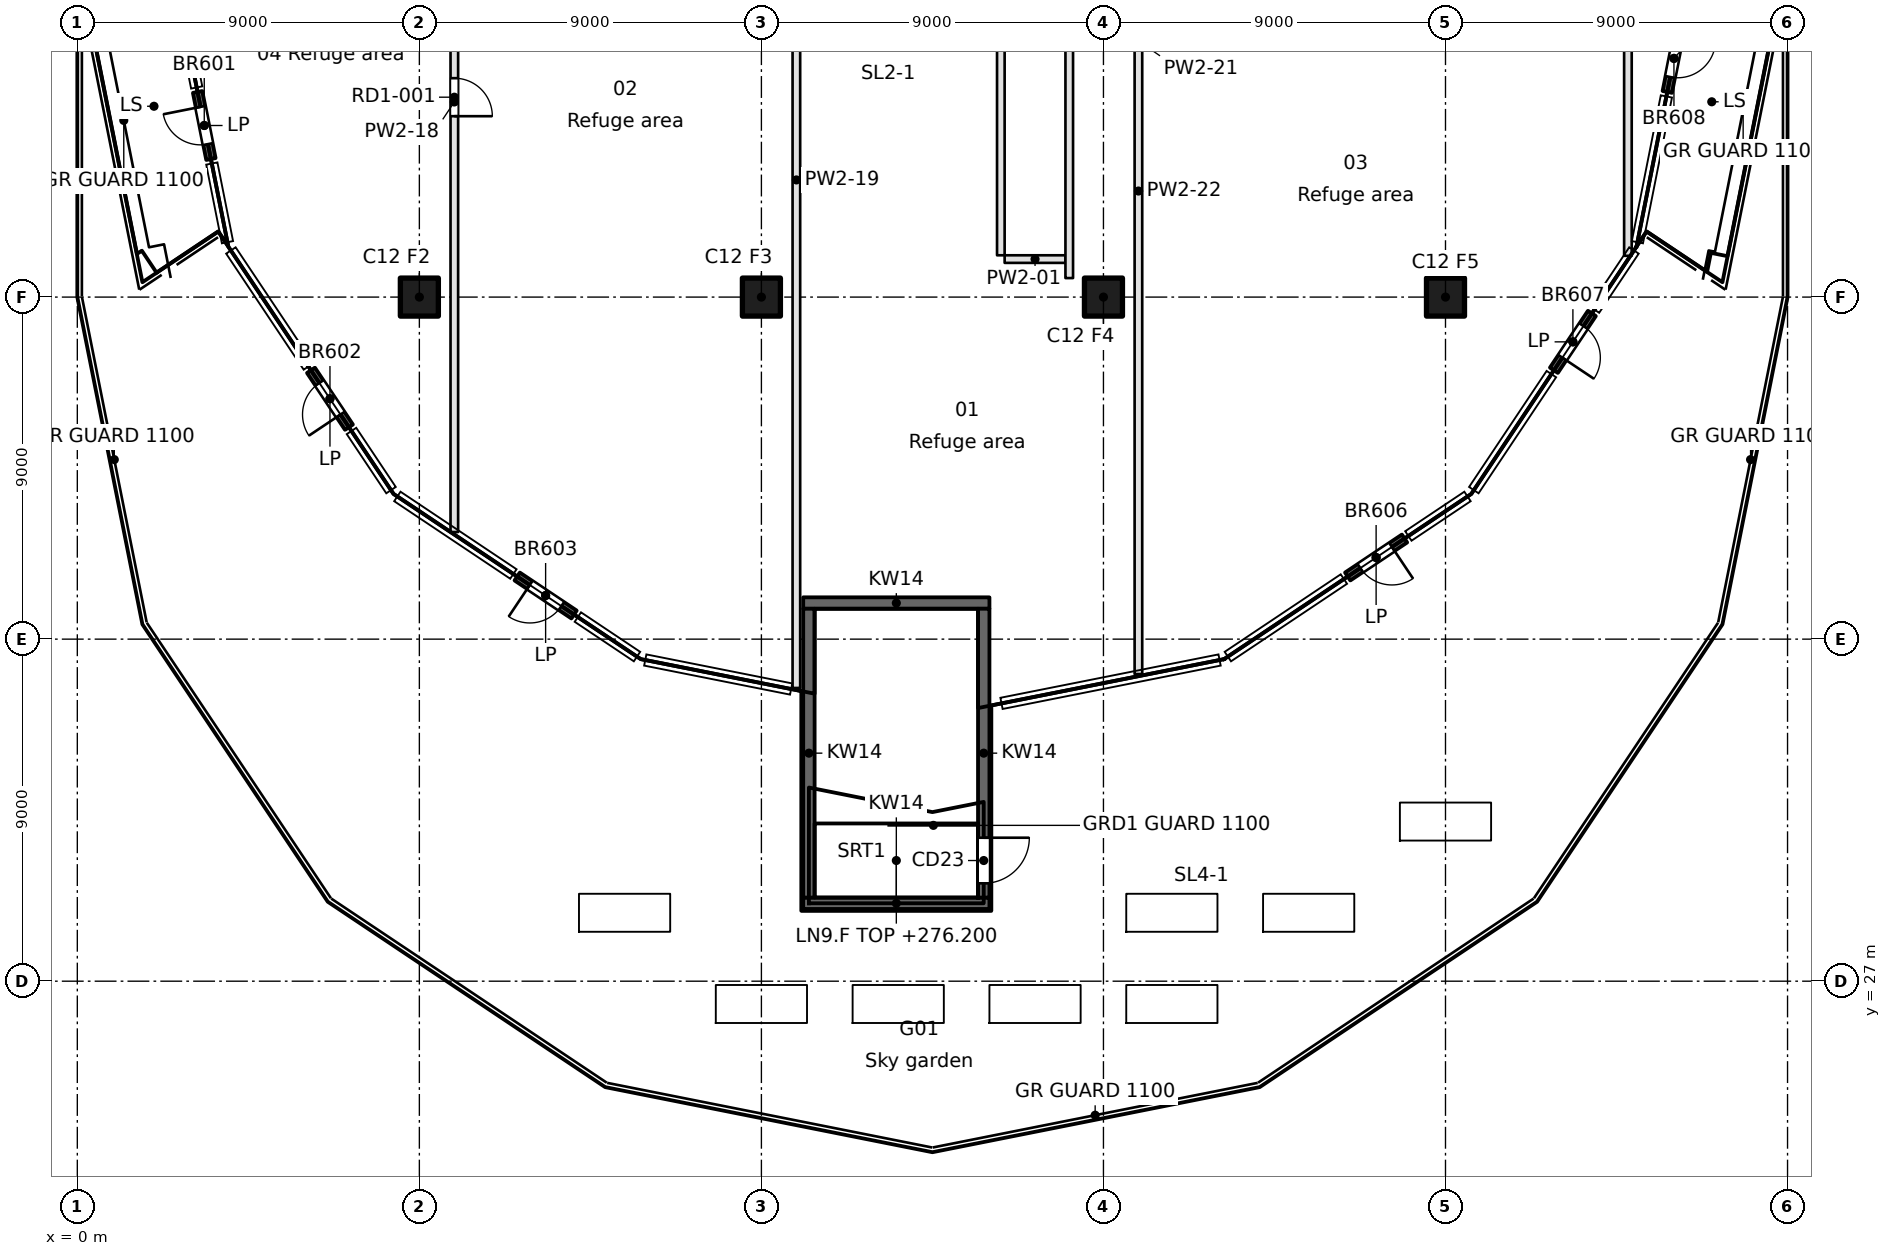
"""IFC4 building model, lengths in metres.
Left out: names, types, materials, properties, quantities, classifications, styles, units other than length and angle.
Written with IfcOpenShell. Run it as: python <this file> out.ifc"""

import sys

from ifc_helpers import new_model, si_unit, direction, frame, frame_2d, origin, origin_2d, place, context, subcontext, project, spatial, rectangle, extrude, element, fill, save


model = new_model("IFC4")
c1 = context("Model", 3, precision=1e-05, world=origin(), true_north=direction((0.0, 1.0)))
c2 = subcontext(c1, "Body", "Model", "MODEL_VIEW")
j1 = project(units=[si_unit("LENGTHUNIT", "METRE"), si_unit("PLANEANGLEUNIT", "RADIAN")], contexts=[c1])
p1 = place(None, origin())
s1 = spatial("IfcSite", under=j1, at=p1, CompositionType="ELEMENT")
p2 = place(p1, origin())
s2 = spatial("IfcBuilding", under=s1, at=p2, CompositionType="ELEMENT")
p3 = place(p2, frame((0.0, 0.0, 276.2)))
s3 = spatial("IfcBuildingStorey", under=s2, at=p3, CompositionType="ELEMENT", Elevation=276.2)
for number, where, z_axis, x_axis in (
    (1, (9.0, 45.0, 0.0), (0.0, 0.0, 1.0), (1.0, 0.0, 0.0)),
    (2, (18.0, 45.0, 0.0), (0.0, 0.0, 1.0), (1.0, 0.0, 0.0)),
    (3, (27.0, 45.0, 0.0), (0.0, 0.0, 1.0), (1.0, 0.0, 0.0)),
    (4, (36.0, 45.0, 0.0), (0.0, 0.0, 1.0), (1.0, 0.0, 0.0)),
):
    element("IfcColumn", number, at=place(p3, frame(where, z_axis=z_axis, x_axis=x_axis)), inside=s3, PredefinedType="COLUMN", context=c2, shape_type="SweptSolid", body=[
        extrude(rectangle(XDim=1.0, YDim=1.0, at=origin_2d()), origin(), (0.0, 0.0, 1.0), 4.6),
    ])
p4 = place(p3, frame((3.165, 50.397, 0.0), z_axis=(0.0, 0.0, 1.0), x_axis=(0.19517704197, -0.980768026746, 0.0)))
e5 = element("IfcWall", 5, at=p4, inside=s3, PredefinedType="SOLIDWALL", context=c2, shape_type="SweptSolid", body=[
    extrude(rectangle(XDim=1.8, YDim=0.25, at=frame_2d((0.9, 0.0))), origin(), (0.0, 0.0, 1.0), 4.2),
])
p5 = place(p4, frame((0.4, 0.0, 0.0)))
e6 = element("IfcOpeningElement", 6, at=p5, cuts=e5, PredefinedType="OPENING", context=c2, shape_type="SweptSolid", body=[
    extrude(rectangle(XDim=1.0, YDim=2.1, at=frame_2d((0.5, 1.05))), frame((0.0, 0.125, 0.0), z_axis=(0.0, -1.0, 0.0), x_axis=(1.0, 0.0, 0.0)), (0.0, 0.0, 1.0), 0.25),
])
p6 = place(p3, frame((6.148, 43.074, 0.0), z_axis=(0.0, 0.0, 1.0), x_axis=(0.555576323502, -0.83146554274, 0.0)))
e7 = element("IfcWall", 7, at=p6, inside=s3, PredefinedType="SOLIDWALL", context=c2, shape_type="SweptSolid", body=[
    extrude(rectangle(XDim=1.8, YDim=0.25, at=frame_2d((0.9, 0.0))), origin(), (0.0, 0.0, 1.0), 4.2),
])
p7 = place(p6, frame((0.4, 0.0, 0.0)))
e8 = element("IfcOpeningElement", 8, at=p7, cuts=e7, PredefinedType="OPENING", context=c2, shape_type="SweptSolid", body=[
    extrude(rectangle(XDim=1.0, YDim=2.1, at=frame_2d((0.5, 1.05))), frame((0.0, 0.125, 0.0), z_axis=(0.0, -1.0, 0.0), x_axis=(1.0, 0.0, 0.0)), (0.0, 0.0, 1.0), 0.25),
])
p8 = place(p3, frame((11.574, 37.648, 0.0), z_axis=(0.0, 0.0, 1.0), x_axis=(0.83146554274, -0.555576323502, 0.0)))
e9 = element("IfcWall", 9, at=p8, inside=s3, PredefinedType="SOLIDWALL", context=c2, shape_type="SweptSolid", body=[
    extrude(rectangle(XDim=1.8, YDim=0.25, at=frame_2d((0.9, 0.0))), origin(), (0.0, 0.0, 1.0), 4.2),
])
p9 = place(p8, frame((0.4, 0.0, 0.0)))
e10 = element("IfcOpeningElement", 10, at=p9, cuts=e9, PredefinedType="OPENING", context=c2, shape_type="SweptSolid", body=[
    extrude(rectangle(XDim=1.0, YDim=2.1, at=frame_2d((0.5, 1.05))), frame((0.0, 0.125, 0.0), z_axis=(0.0, -1.0, 0.0), x_axis=(1.0, 0.0, 0.0)), (0.0, 0.0, 1.0), 0.25),
])
p10 = place(p3, frame((33.426, 37.648, 0.0), z_axis=(0.0, 0.0, 1.0), x_axis=(0.83146554274, 0.555576323502, 0.0)))
e11 = element("IfcWall", 11, at=p10, inside=s3, PredefinedType="SOLIDWALL", context=c2, shape_type="SweptSolid", body=[
    extrude(rectangle(XDim=1.8, YDim=0.25, at=frame_2d((0.9, 0.0))), origin(), (0.0, 0.0, 1.0), 4.2),
])
p11 = place(p10, frame((0.4, 0.0, 0.0)))
e12 = element("IfcOpeningElement", 12, at=p11, cuts=e11, PredefinedType="OPENING", context=c2, shape_type="SweptSolid", body=[
    extrude(rectangle(XDim=1.0, YDim=2.1, at=frame_2d((0.5, 1.05))), frame((0.0, 0.125, 0.0), z_axis=(0.0, -1.0, 0.0), x_axis=(1.0, 0.0, 0.0)), (0.0, 0.0, 1.0), 0.25),
])
p12 = place(p3, frame((38.852, 43.074, 0.0), z_axis=(0.0, 0.0, 1.0), x_axis=(0.555576323502, 0.83146554274, 0.0)))
e13 = element("IfcWall", 13, at=p12, inside=s3, PredefinedType="SOLIDWALL", context=c2, shape_type="SweptSolid", body=[
    extrude(rectangle(XDim=1.8, YDim=0.25, at=frame_2d((0.9, 0.0))), origin(), (0.0, 0.0, 1.0), 4.2),
])
p13 = place(p12, frame((0.4, 0.0, 0.0)))
e14 = element("IfcOpeningElement", 14, at=p13, cuts=e13, PredefinedType="OPENING", context=c2, shape_type="SweptSolid", body=[
    extrude(rectangle(XDim=1.0, YDim=2.1, at=frame_2d((0.5, 1.05))), frame((0.0, 0.125, 0.0), z_axis=(0.0, -1.0, 0.0), x_axis=(1.0, 0.0, 0.0)), (0.0, 0.0, 1.0), 0.25),
])
p14 = place(p3, frame((41.835, 50.398, 0.0), z_axis=(0.0, 0.0, 1.0), x_axis=(0.19517704197, 0.980768026746, 0.0)))
e15 = element("IfcWall", 15, at=p14, inside=s3, PredefinedType="SOLIDWALL", context=c2, shape_type="SweptSolid", body=[
    extrude(rectangle(XDim=1.8, YDim=0.25, at=frame_2d((0.9, 0.0))), origin(), (0.0, 0.0, 1.0), 4.2),
])
p15 = place(p14, frame((0.4, 0.0, 0.0)))
e16 = element("IfcOpeningElement", 16, at=p15, cuts=e15, PredefinedType="OPENING", context=c2, shape_type="SweptSolid", body=[
    extrude(rectangle(XDim=1.0, YDim=2.1, at=frame_2d((0.5, 1.05))), frame((0.0, 0.125, 0.0), z_axis=(0.0, -1.0, 0.0), x_axis=(1.0, 0.0, 0.0)), (0.0, 0.0, 1.0), 0.25),
])
for number, where, z_axis, x_axis in (
    (17, (19.1, 29.05, -0.45), (0.0, 0.0, 1.0), (1.0, 0.0, 0.0)),
    (18, (19.1, 36.95, -0.45), (0.0, 0.0, 1.0), (1.0, 0.0, 0.0)),
):
    element("IfcWall", number, at=place(p3, frame(where, z_axis=z_axis, x_axis=x_axis)), inside=s3, PredefinedType="SOLIDWALL", context=c2, shape_type="SweptSolid", body=[
        extrude(rectangle(XDim=4.9, YDim=0.3, at=frame_2d((2.45, 0.0))), origin(), (0.0, 0.0, 1.0), 4.65),
    ])
p16 = place(p3, frame((19.25, 29.2, -0.45), z_axis=(0.0, 0.0, 1.0), x_axis=(0.0, 1.0, 0.0)))
e19 = element("IfcWall", 19, at=p16, inside=s3, PredefinedType="SOLIDWALL", context=c2, shape_type="SweptSolid", body=[
    extrude(rectangle(XDim=7.6, YDim=0.3, at=frame_2d((3.8, 0.0))), origin(), (0.0, 0.0, 1.0), 4.65),
])
p17 = place(p3, frame((23.85, 29.2, -0.45), z_axis=(0.0, 0.0, 1.0), x_axis=(0.0, 1.0, 0.0)))
e20 = element("IfcWall", 20, at=p17, inside=s3, PredefinedType="SOLIDWALL", context=c2, shape_type="SweptSolid", body=[
    extrude(rectangle(XDim=7.6, YDim=0.3, at=frame_2d((3.8, 0.0))), origin(), (0.0, 0.0, 1.0), 4.65),
])
p18 = place(p17, frame((0.375, 0.0, 0.45)))
e21 = element("IfcOpeningElement", 21, at=p18, cuts=e20, PredefinedType="OPENING", context=c2, shape_type="SweptSolid", body=[
    extrude(rectangle(XDim=1.2, YDim=2.1, at=frame_2d((0.6, 1.05))), frame((0.0, 0.15, 0.0), z_axis=(0.0, -1.0, 0.0), x_axis=(1.0, 0.0, 0.0)), (0.0, 0.0, 1.0), 0.3),
])
p19 = place(p3, frame((26.0, 46.0, 0.0), z_axis=(0.0, 0.0, 1.0), x_axis=(-1.0, 0.0, 0.0)))
e22 = element("IfcWall", 22, at=p19, inside=s3, PredefinedType="PARTITIONING", context=c2, shape_type="SweptSolid", body=[
    extrude(rectangle(XDim=1.6, YDim=0.2, at=frame_2d((0.8, 0.0))), origin(), (0.0, 0.0, 1.0), 4.2),
])
p20 = place(p3, frame((9.92, 38.818, 0.0), z_axis=(0.0, 0.0, 1.0), x_axis=(0.0, 1.0, 0.0)))
e23 = element("IfcWall", 23, at=p20, inside=s3, PredefinedType="PARTITIONING", context=c2, shape_type="SweptSolid", body=[
    extrude(rectangle(XDim=22.632, YDim=0.2, at=frame_2d((11.316, 0.0))), origin(), (0.0, 0.0, 1.0), 4.2),
])
p21 = place(p20, frame((10.942, 0.0, 0.0)))
e24 = element("IfcOpeningElement", 24, at=p21, cuts=e23, PredefinedType="OPENING", context=c2, shape_type="SweptSolid", body=[
    extrude(rectangle(XDim=1.0, YDim=2.1, at=frame_2d((0.5, 1.05))), frame((0.0, 0.1, 0.0), z_axis=(0.0, -1.0, 0.0), x_axis=(1.0, 0.0, 0.0)), (0.0, 0.0, 1.0), 0.2),
])
p22 = place(p20, frame((13.442, 0.0, 0.0)))
e25 = element("IfcOpeningElement", 25, at=p22, cuts=e23, PredefinedType="OPENING", context=c2, shape_type="SweptSolid", body=[
    extrude(rectangle(XDim=1.0, YDim=2.1, at=frame_2d((0.5, 1.05))), frame((0.0, 0.1, 0.0), z_axis=(0.0, -1.0, 0.0), x_axis=(1.0, 0.0, 0.0)), (0.0, 0.0, 1.0), 0.2),
])
p23 = place(p3, frame((18.92, 61.45, 0.0), z_axis=(0.0, 0.0, 1.0), x_axis=(0.0, -1.0, 0.0)))
e26 = element("IfcWall", 26, at=p23, inside=s3, PredefinedType="PARTITIONING", context=c2, shape_type="SweptSolid", body=[
    extrude(rectangle(XDim=26.735, YDim=0.2, at=frame_2d((13.367, 0.0))), origin(), (0.0, 0.0, 1.0), 4.2),
])
p24 = place(p3, frame((24.3, 46.1, 0.0), z_axis=(0.0, 0.0, 1.0), x_axis=(0.0, 1.0, 0.0)))
e27 = element("IfcWall", 27, at=p24, inside=s3, PredefinedType="PARTITIONING", context=c2, shape_type="SweptSolid", body=[
    extrude(rectangle(XDim=15.35, YDim=0.2, at=frame_2d((7.675, 0.0))), origin(), (0.0, 0.0, 1.0), 4.2),
])
p25 = place(p24, frame((7.175, 0.0, 0.0)))
e28 = element("IfcOpeningElement", 28, at=p25, cuts=e27, PredefinedType="OPENING", context=c2, shape_type="SweptSolid", body=[
    extrude(rectangle(XDim=1.0, YDim=2.1, at=frame_2d((0.5, 1.05))), frame((0.0, 0.1, 0.0), z_axis=(0.0, -1.0, 0.0), x_axis=(1.0, 0.0, 0.0)), (0.0, 0.0, 1.0), 0.2),
])
p26 = place(p24, frame((9.675, 0.0, 0.0)))
e29 = element("IfcOpeningElement", 29, at=p26, cuts=e27, PredefinedType="OPENING", context=c2, shape_type="SweptSolid", body=[
    extrude(rectangle(XDim=1.0, YDim=2.1, at=frame_2d((0.5, 1.05))), frame((0.0, 0.1, 0.0), z_axis=(0.0, -1.0, 0.0), x_axis=(1.0, 0.0, 0.0)), (0.0, 0.0, 1.0), 0.2),
])
p27 = place(p3, frame((26.1, 60.5, 0.0), z_axis=(0.0, 0.0, 1.0), x_axis=(0.0, -1.0, 0.0)))
e30 = element("IfcWall", 30, at=p27, inside=s3, PredefinedType="PARTITIONING", context=c2, shape_type="SweptSolid", body=[
    extrude(rectangle(XDim=15.0, YDim=0.2, at=frame_2d((7.5, 0.0))), origin(), (0.0, 0.0, 1.0), 4.2),
])
p28 = place(p3, frame((27.92, 60.5, 0.0), z_axis=(0.0, 0.0, 1.0), x_axis=(0.0, -1.0, 0.0)))
e31 = element("IfcWall", 31, at=p28, inside=s3, PredefinedType="PARTITIONING", context=c2, shape_type="SweptSolid", body=[
    extrude(rectangle(XDim=25.419, YDim=0.2, at=frame_2d((12.709, 0.0))), origin(), (0.0, 0.0, 1.0), 4.2),
])
p29 = place(p3, frame((40.8, 46.086, 0.0), z_axis=(0.0, 0.0, 1.0), x_axis=(0.0, 1.0, 0.0)))
e32 = element("IfcWall", 32, at=p29, inside=s3, PredefinedType="PARTITIONING", context=c2, shape_type="SweptSolid", body=[
    extrude(rectangle(XDim=14.514, YDim=0.2, at=frame_2d((7.257, 0.0))), origin(), (0.0, 0.0, 1.0), 4.2),
])
p30 = place(p29, frame((6.757, 0.0, 0.0)))
e33 = element("IfcOpeningElement", 33, at=p30, cuts=e32, PredefinedType="OPENING", context=c2, shape_type="SweptSolid", body=[
    extrude(rectangle(XDim=1.0, YDim=2.1, at=frame_2d((0.5, 1.05))), frame((0.0, 0.1, 0.0), z_axis=(0.0, -1.0, 0.0), x_axis=(1.0, 0.0, 0.0)), (0.0, 0.0, 1.0), 0.2),
])
p31 = place(p29, frame((9.257, 0.0, 0.0)))
e34 = element("IfcOpeningElement", 34, at=p31, cuts=e32, PredefinedType="OPENING", context=c2, shape_type="SweptSolid", body=[
    extrude(rectangle(XDim=1.0, YDim=2.1, at=frame_2d((0.5, 1.05))), frame((0.0, 0.1, 0.0), z_axis=(0.0, -1.0, 0.0), x_axis=(1.0, 0.0, 0.0)), (0.0, 0.0, 1.0), 0.2),
])
p32 = place(p5, frame((1.0, 0.0, 0.0), z_axis=(0.0, 0.0, 1.0), x_axis=(-1.0, 0.0, 0.0)))
e35 = element("IfcDoor", 35, at=p32, inside=s3, OperationType="SINGLE_SWING_RIGHT", PredefinedType="DOOR", context=c2, shape_type="SweptSolid", body=[
    extrude(rectangle(XDim=1.0, YDim=2.1, at=frame_2d((0.5, 1.05))), frame((0.0, 0.025, 0.0), z_axis=(0.0, -1.0, 0.0), x_axis=(1.0, 0.0, 0.0)), (0.0, 0.0, 1.0), 0.05),
])
fill(e6, e35)
p33 = place(p7, frame((1.0, 0.0, 0.0), z_axis=(0.0, 0.0, 1.0), x_axis=(-1.0, 0.0, 0.0)))
e36 = element("IfcDoor", 36, at=p33, inside=s3, OperationType="SINGLE_SWING_LEFT", PredefinedType="DOOR", context=c2, shape_type="SweptSolid", body=[
    extrude(rectangle(XDim=1.0, YDim=2.1, at=frame_2d((0.5, 1.05))), frame((0.0, 0.025, 0.0), z_axis=(0.0, -1.0, 0.0), x_axis=(1.0, 0.0, 0.0)), (0.0, 0.0, 1.0), 0.05),
])
fill(e8, e36)
p34 = place(p9, frame((1.0, 0.0, 0.0), z_axis=(0.0, 0.0, 1.0), x_axis=(-1.0, 0.0, 0.0)))
e37 = element("IfcDoor", 37, at=p34, inside=s3, OperationType="SINGLE_SWING_RIGHT", PredefinedType="DOOR", context=c2, shape_type="SweptSolid", body=[
    extrude(rectangle(XDim=1.0, YDim=2.1, at=frame_2d((0.5, 1.05))), frame((0.0, 0.025, 0.0), z_axis=(0.0, -1.0, 0.0), x_axis=(1.0, 0.0, 0.0)), (0.0, 0.0, 1.0), 0.05),
])
fill(e10, e37)
p35 = place(p11, frame((1.0, 0.0, 0.0), z_axis=(0.0, 0.0, 1.0), x_axis=(-1.0, 0.0, 0.0)))
e38 = element("IfcDoor", 38, at=p35, inside=s3, OperationType="SINGLE_SWING_LEFT", PredefinedType="DOOR", context=c2, shape_type="SweptSolid", body=[
    extrude(rectangle(XDim=1.0, YDim=2.1, at=frame_2d((0.5, 1.05))), frame((0.0, 0.025, 0.0), z_axis=(0.0, -1.0, 0.0), x_axis=(1.0, 0.0, 0.0)), (0.0, 0.0, 1.0), 0.05),
])
fill(e12, e38)
p36 = place(p13, frame((1.0, 0.0, 0.0), z_axis=(0.0, 0.0, 1.0), x_axis=(-1.0, 0.0, 0.0)))
e39 = element("IfcDoor", 39, at=p36, inside=s3, OperationType="SINGLE_SWING_RIGHT", PredefinedType="DOOR", context=c2, shape_type="SweptSolid", body=[
    extrude(rectangle(XDim=1.0, YDim=2.1, at=frame_2d((0.5, 1.05))), frame((0.0, 0.025, 0.0), z_axis=(0.0, -1.0, 0.0), x_axis=(1.0, 0.0, 0.0)), (0.0, 0.0, 1.0), 0.05),
])
fill(e14, e39)
p37 = place(p15, frame((1.0, 0.0, 0.0), z_axis=(0.0, 0.0, 1.0), x_axis=(-1.0, 0.0, 0.0)))
e40 = element("IfcDoor", 40, at=p37, inside=s3, OperationType="SINGLE_SWING_LEFT", PredefinedType="DOOR", context=c2, shape_type="SweptSolid", body=[
    extrude(rectangle(XDim=1.0, YDim=2.1, at=frame_2d((0.5, 1.05))), frame((0.0, 0.025, 0.0), z_axis=(0.0, -1.0, 0.0), x_axis=(1.0, 0.0, 0.0)), (0.0, 0.0, 1.0), 0.05),
])
fill(e16, e40)
p38 = place(p18, frame((1.2, 0.0, 0.0), z_axis=(0.0, 0.0, 1.0), x_axis=(-1.0, 0.0, 0.0)))
e41 = element("IfcDoor", 41, at=p38, inside=s3, OperationType="SINGLE_SWING_LEFT", PredefinedType="DOOR", context=c2, shape_type="SweptSolid", body=[
    extrude(rectangle(XDim=1.2, YDim=2.1, at=frame_2d((0.6, 1.05))), frame((0.0, 0.025, 0.0), z_axis=(0.0, -1.0, 0.0), x_axis=(1.0, 0.0, 0.0)), (0.0, 0.0, 1.0), 0.05),
])
fill(e21, e41)
p39 = place(p21, frame((1.0, 0.0, 0.0), z_axis=(0.0, 0.0, 1.0), x_axis=(-1.0, 0.0, 0.0)))
e42 = element("IfcDoor", 42, at=p39, inside=s3, OperationType="SINGLE_SWING_RIGHT", PredefinedType="DOOR", context=c2, shape_type="SweptSolid", body=[
    extrude(rectangle(XDim=1.0, YDim=2.1, at=frame_2d((0.5, 1.05))), frame((0.0, 0.025, 0.0), z_axis=(0.0, -1.0, 0.0), x_axis=(1.0, 0.0, 0.0)), (0.0, 0.0, 1.0), 0.05),
])
fill(e24, e42)
save(model, sys.argv[1])
